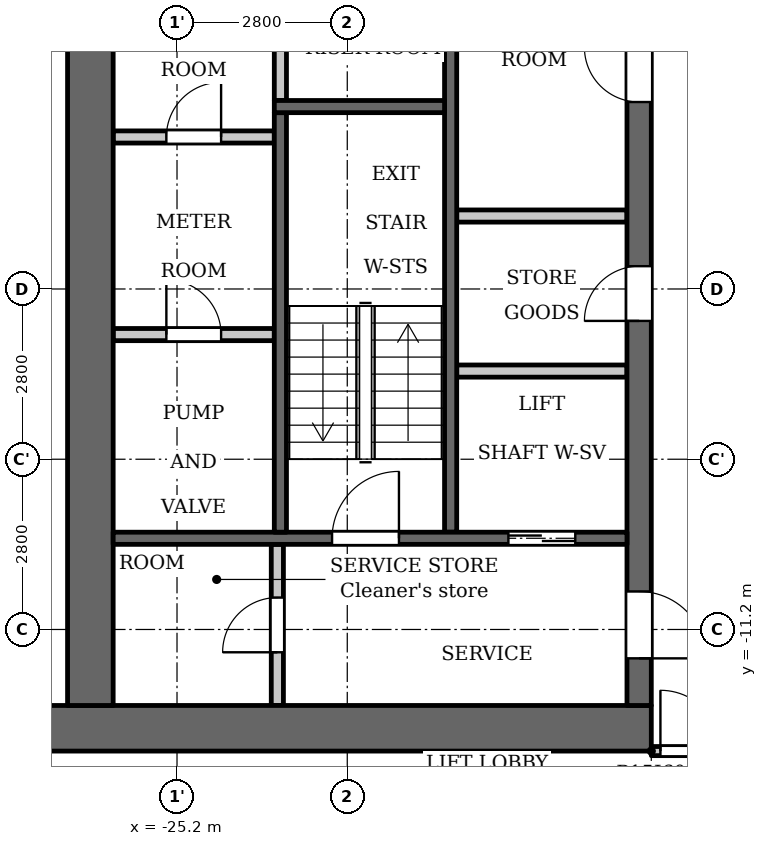
"""IFC4 building model, lengths in metres.
Left out: names, types, materials, properties, quantities, classifications, styles, units other than length and angle.
Written with IfcOpenShell. Run it as: python <this file> out.ifc"""

import sys

from ifc_helpers import new_model, si_unit, direction, frame, frame_2d, origin, place, context, subcontext, project, spatial, rectangle, extrude, element, fill, save


model = new_model("IFC4")
c1 = context("Model", 3, precision=1e-05, world=origin(), true_north=direction((0.0, 1.0)))
c2 = subcontext(c1, "Body", "Model", "MODEL_VIEW")
j1 = project(units=[si_unit("LENGTHUNIT", "METRE"), si_unit("PLANEANGLEUNIT", "RADIAN")], contexts=[c1])
p1 = place(None, origin())
s1 = spatial("IfcSite", under=j1, at=p1, CompositionType="ELEMENT")
p2 = place(p1, origin())
s2 = spatial("IfcBuilding", under=s1, at=p2, CompositionType="ELEMENT")
p3 = place(p2, frame((0.0, 0.0, 150.1)))
s3 = spatial("IfcBuildingStorey", under=s2, at=p3, CompositionType="ELEMENT", Elevation=150.1)
p4 = place(p3, frame((-23.5, -2.5, 0.0), z_axis=(0.0, 0.0, 1.0), x_axis=(0.0, 1.0, 0.0)))
e1 = element("IfcWall", 1, at=p4, inside=s3, PredefinedType="PARTITIONING", context=c2, shape_type="SweptSolid", body=[
    extrude(rectangle(XDim=2.65, YDim=0.2, at=frame_2d((1.325, 0.0))), origin(), (0.0, 0.0, 1.0), 3.2),
])
p5 = place(p3, frame((-20.7, -9.6, 0.0), z_axis=(0.0, 0.0, 1.0), x_axis=(0.0, 1.0, 0.0)))
e2 = element("IfcWall", 2, at=p5, inside=s3, PredefinedType="SHEAR", context=c2, shape_type="SweptSolid", body=[
    extrude(rectangle(XDim=9.75, YDim=0.2, at=frame_2d((4.875, 0.0))), origin(), (0.0, 0.0, 1.0), 3.2),
])
p6 = place(p3, frame((-17.4, -12.825, 0.0), z_axis=(0.0, 0.0, 1.0), x_axis=(-1.0, 0.0, 0.0)))
e3 = element("IfcWall", 3, at=p6, inside=s3, PredefinedType="SHEAR", context=c2, shape_type="SweptSolid", body=[
    extrude(rectangle(XDim=10.4, YDim=0.75, at=frame_2d((5.2, 0.0))), origin(), (0.0, 0.0, 1.0), 3.2),
])
p7 = place(p3, frame((-17.8, -4.4, 0.0), z_axis=(0.0, 0.0, 1.0), x_axis=(-1.0, 0.0, 0.0)))
e4 = element("IfcWall", 4, at=p7, inside=s3, PredefinedType="PARTITIONING", context=c2, shape_type="SweptSolid", body=[
    extrude(rectangle(XDim=2.8, YDim=0.2, at=frame_2d((1.4, 0.0))), origin(), (0.0, 0.0, 1.0), 3.2),
])
p8 = place(p3, frame((-17.6, -12.45, 0.0), z_axis=(0.0, 0.0, 1.0), x_axis=(0.0, 1.0, 0.0)))
e5 = element("IfcWall", 5, at=p8, inside=s3, PredefinedType="SHEAR", context=c2, shape_type="SweptSolid", body=[
    extrude(rectangle(XDim=24.9, YDim=0.4, at=frame_2d((12.45, 0.0))), origin(), (0.0, 0.0, 1.0), 3.2),
])
p9 = place(p8, frame((6.325, 0.0, 0.0)))
e6 = element("IfcOpeningElement", 6, at=p9, cuts=e5, PredefinedType="OPENING", context=c2, shape_type="SweptSolid", body=[
    extrude(rectangle(XDim=0.9, YDim=2.1, at=frame_2d((0.45, 1.05))), frame((0.0, 0.21, 0.0), z_axis=(0.0, -1.0, 0.0), x_axis=(1.0, 0.0, 0.0)), (0.0, 0.0, 1.0), 0.42),
])
p10 = place(p8, frame((9.925, 0.0, 0.0)))
e7 = element("IfcOpeningElement", 7, at=p10, cuts=e5, PredefinedType="OPENING", context=c2, shape_type="SweptSolid", body=[
    extrude(rectangle(XDim=0.9, YDim=2.1, at=frame_2d((0.45, 1.05))), frame((0.0, 0.21, 0.0), z_axis=(0.0, -1.0, 0.0), x_axis=(1.0, 0.0, 0.0)), (0.0, 0.0, 1.0), 0.42),
])
p11 = place(p8, frame((15.6, 0.0, 0.0)))
e8 = element("IfcOpeningElement", 8, at=p11, cuts=e5, PredefinedType="OPENING", context=c2, shape_type="SweptSolid", body=[
    extrude(rectangle(XDim=1.1, YDim=2.1, at=frame_2d((0.55, 1.05))), frame((0.0, 0.21, 0.0), z_axis=(0.0, -1.0, 0.0), x_axis=(1.0, 0.0, 0.0)), (0.0, 0.0, 1.0), 0.42),
])
p12 = place(p8, frame((18.0, 0.0, 0.0)))
e9 = element("IfcOpeningElement", 9, at=p12, cuts=e5, PredefinedType="OPENING", context=c2, shape_type="SweptSolid", body=[
    extrude(rectangle(XDim=1.1, YDim=2.1, at=frame_2d((0.55, 1.05))), frame((0.0, 0.21, 0.0), z_axis=(0.0, -1.0, 0.0), x_axis=(1.0, 0.0, 0.0)), (0.0, 0.0, 1.0), 0.42),
])
p13 = place(p8, frame((23.025, 0.0, 0.0)))
e10 = element("IfcOpeningElement", 10, at=p13, cuts=e5, PredefinedType="OPENING", context=c2, shape_type="SweptSolid", body=[
    extrude(rectangle(XDim=1.1, YDim=2.1, at=frame_2d((0.55, 1.05))), frame((0.0, 0.21, 0.0), z_axis=(0.0, -1.0, 0.0), x_axis=(1.0, 0.0, 0.0)), (0.0, 0.0, 1.0), 0.42),
])
p14 = place(p8, frame((0.775, 0.0, 0.0)))
e11 = element("IfcOpeningElement", 11, at=p14, cuts=e5, PredefinedType="OPENING", context=c2, shape_type="SweptSolid", body=[
    extrude(rectangle(XDim=1.1, YDim=2.1, at=frame_2d((0.55, 1.05))), frame((0.0, 0.21, 0.0), z_axis=(0.0, -1.0, 0.0), x_axis=(1.0, 0.0, 0.0)), (0.0, 0.0, 1.0), 0.42),
])
p15 = place(p8, frame((12.925, 0.0, 0.0)))
e12 = element("IfcOpeningElement", 12, at=p15, cuts=e5, PredefinedType="OPENING", context=c2, shape_type="SweptSolid", body=[
    extrude(rectangle(XDim=1.8, YDim=2.1, at=frame_2d((0.9, 1.05))), frame((0.0, 0.21, 0.0), z_axis=(0.0, -1.0, 0.0), x_axis=(1.0, 0.0, 0.0)), (0.0, 0.0, 1.0), 0.42),
])
p16 = place(p3, frame((-26.625, -12.45, 0.0), z_axis=(0.0, 0.0, 1.0), x_axis=(0.0, 1.0, 0.0)))
e13 = element("IfcWall", 13, at=p16, inside=s3, PredefinedType="SHEAR", context=c2, shape_type="SweptSolid", body=[
    extrude(rectangle(XDim=24.9, YDim=0.75, at=frame_2d((12.45, 0.0))), origin(), (0.0, 0.0, 1.0), 3.2),
])
p17 = place(p3, frame((-23.55, -12.45, 0.0), z_axis=(0.0, 0.0, 1.0), x_axis=(0.0, 1.0, 0.0)))
e14 = element("IfcWall", 14, at=p17, inside=s3, PredefinedType="PARTITIONING", context=c2, shape_type="SweptSolid", body=[
    extrude(rectangle(XDim=2.65, YDim=0.2, at=frame_2d((1.325, 0.0))), origin(), (0.0, 0.0, 1.0), 3.2),
])
p18 = place(p17, frame((0.875, 0.0, 0.0)))
e15 = element("IfcOpeningElement", 15, at=p18, cuts=e14, PredefinedType="OPENING", context=c2, shape_type="SweptSolid", body=[
    extrude(rectangle(XDim=0.9, YDim=2.1, at=frame_2d((0.45, 1.05))), frame((0.0, 0.11, 0.0), z_axis=(0.0, -1.0, 0.0), x_axis=(1.0, 0.0, 0.0)), (0.0, 0.0, 1.0), 0.22),
])
p19 = place(p3, frame((-23.6, -6.35, 0.0), z_axis=(0.0, 0.0, 1.0), x_axis=(-1.0, 0.0, 0.0)))
e16 = element("IfcWall", 16, at=p19, inside=s3, PredefinedType="PARTITIONING", context=c2, shape_type="SweptSolid", body=[
    extrude(rectangle(XDim=2.65, YDim=0.2, at=frame_2d((1.325, 0.0))), origin(), (0.0, 0.0, 1.0), 3.2),
])
p20 = place(p19, frame((0.875, 0.0, 0.0)))
e17 = element("IfcOpeningElement", 17, at=p20, cuts=e16, PredefinedType="OPENING", context=c2, shape_type="SweptSolid", body=[
    extrude(rectangle(XDim=0.9, YDim=2.1, at=frame_2d((0.45, 1.05))), frame((0.0, 0.11, 0.0), z_axis=(0.0, -1.0, 0.0), x_axis=(1.0, 0.0, 0.0)), (0.0, 0.0, 1.0), 0.22),
])
p21 = place(p3, frame((-23.6, -3.1, 0.0), z_axis=(0.0, 0.0, 1.0), x_axis=(-1.0, 0.0, 0.0)))
e18 = element("IfcWall", 18, at=p21, inside=s3, PredefinedType="PARTITIONING", context=c2, shape_type="SweptSolid", body=[
    extrude(rectangle(XDim=2.65, YDim=0.2, at=frame_2d((1.325, 0.0))), origin(), (0.0, 0.0, 1.0), 3.2),
])
p22 = place(p21, frame((0.875, 0.0, 0.0)))
e19 = element("IfcOpeningElement", 19, at=p22, cuts=e18, PredefinedType="OPENING", context=c2, shape_type="SweptSolid", body=[
    extrude(rectangle(XDim=0.9, YDim=2.1, at=frame_2d((0.45, 1.05))), frame((0.0, 0.11, 0.0), z_axis=(0.0, -1.0, 0.0), x_axis=(1.0, 0.0, 0.0)), (0.0, 0.0, 1.0), 0.22),
])
p23 = place(p3, frame((-17.8, -9.7, 0.0), z_axis=(0.0, 0.0, 1.0), x_axis=(-1.0, 0.0, 0.0)))
e20 = element("IfcWall", 20, at=p23, inside=s3, PredefinedType="SHEAR", context=c2, shape_type="SweptSolid", body=[
    extrude(rectangle(XDim=8.45, YDim=0.2, at=frame_2d((4.225, 0.0))), origin(), (0.0, 0.0, 1.0), 3.2),
])
p24 = place(p23, frame((0.85, 0.0, 0.0)))
e21 = element("IfcOpeningElement", 21, at=p24, cuts=e20, PredefinedType="OPENING", context=c2, shape_type="SweptSolid", body=[
    extrude(rectangle(XDim=1.1, YDim=2.1, at=frame_2d((0.55, 1.05))), frame((0.0, 0.11, 0.0), z_axis=(0.0, -1.0, 0.0), x_axis=(1.0, 0.0, 0.0)), (0.0, 0.0, 1.0), 0.22),
])
p25 = place(p23, frame((3.75, 0.0, 0.0)))
e22 = element("IfcOpeningElement", 22, at=p25, cuts=e20, PredefinedType="OPENING", context=c2, shape_type="SweptSolid", body=[
    extrude(rectangle(XDim=1.1, YDim=2.1, at=frame_2d((0.55, 1.05))), frame((0.0, 0.11, 0.0), z_axis=(0.0, -1.0, 0.0), x_axis=(1.0, 0.0, 0.0)), (0.0, 0.0, 1.0), 0.22),
])
p26 = place(p3, frame((-17.8, -6.95, 0.0), z_axis=(0.0, 0.0, 1.0), x_axis=(-1.0, 0.0, 0.0)))
e23 = element("IfcWall", 23, at=p26, inside=s3, PredefinedType="PARTITIONING", context=c2, shape_type="SweptSolid", body=[
    extrude(rectangle(XDim=2.8, YDim=0.2, at=frame_2d((1.4, 0.0))), origin(), (0.0, 0.0, 1.0), 3.2),
])
p27 = place(p3, frame((-23.5, -9.6, 0.0), z_axis=(0.0, 0.0, 1.0), x_axis=(0.0, 1.0, 0.0)))
e24 = element("IfcWall", 24, at=p27, inside=s3, PredefinedType="SHEAR", context=c2, shape_type="SweptSolid", body=[
    extrude(rectangle(XDim=6.9, YDim=0.2, at=frame_2d((3.45, 0.0))), origin(), (0.0, 0.0, 1.0), 3.2),
])
p28 = place(p3, frame((-20.8, -2.6, 0.0), z_axis=(0.0, 0.0, 1.0), x_axis=(-1.0, 0.0, 0.0)))
e25 = element("IfcWall", 25, at=p28, inside=s3, PredefinedType="SHEAR", context=c2, shape_type="SweptSolid", body=[
    extrude(rectangle(XDim=2.8, YDim=0.2, at=frame_2d((1.4, 0.0))), origin(), (0.0, 0.0, 1.0), 3.2),
])
p29 = place(p3, frame((-17.4, -13.2, 0.0), z_axis=(0.0, 0.0, 1.0), x_axis=(1.0, 0.0, 0.0)))
e26 = element("IfcWall", 26, at=p29, inside=s3, PredefinedType="PARTITIONING", context=c2, shape_type="SweptSolid", body=[
    extrude(rectangle(XDim=34.8, YDim=0.15, at=frame_2d((17.4, 0.0))), origin(), (0.0, 0.0, 1.0), 3.2),
])
p30 = place(p29, frame((0.15, 0.0, 0.0)))
e27 = element("IfcOpeningElement", 27, at=p30, cuts=e26, PredefinedType="OPENING", context=c2, shape_type="SweptSolid", body=[
    extrude(rectangle(XDim=1.0, YDim=2.1, at=frame_2d((0.5, 1.05))), frame((0.0, 0.085, 0.0), z_axis=(0.0, -1.0, 0.0), x_axis=(1.0, 0.0, 0.0)), (0.0, 0.0, 1.0), 0.17),
])
p31 = place(p29, frame((33.55, 0.0, 0.0)))
e28 = element("IfcOpeningElement", 28, at=p31, cuts=e26, PredefinedType="OPENING", context=c2, shape_type="SweptSolid", body=[
    extrude(rectangle(XDim=1.0, YDim=2.1, at=frame_2d((0.5, 1.05))), frame((0.0, 0.085, 0.0), z_axis=(0.0, -1.0, 0.0), x_axis=(1.0, 0.0, 0.0)), (0.0, 0.0, 1.0), 0.17),
])
p32 = place(p29, frame((15.7, 0.0, 0.0)))
e29 = element("IfcOpeningElement", 29, at=p32, cuts=e26, PredefinedType="OPENING", context=c2, shape_type="SweptSolid", body=[
    extrude(rectangle(XDim=1.0, YDim=2.1, at=frame_2d((0.5, 1.05))), frame((0.0, 0.085, 0.0), z_axis=(0.0, -1.0, 0.0), x_axis=(1.0, 0.0, 0.0)), (0.0, 0.0, 1.0), 0.17),
])
p33 = place(p24, origin())
e30 = element("IfcDoor", 30, at=p33, inside=s3, OperationType="DOUBLE_DOOR_SLIDING", PredefinedType="DOOR", context=c2, shape_type="SweptSolid", body=[
    extrude(rectangle(XDim=1.1, YDim=2.1, at=frame_2d((0.55, 1.05))), frame((0.0, 0.025, 0.0), z_axis=(0.0, -1.0, 0.0), x_axis=(1.0, 0.0, 0.0)), (0.0, 0.0, 1.0), 0.05),
])
fill(e21, e30)
p34 = place(p9, origin())
e31 = element("IfcDoor", 31, at=p34, inside=s3, OperationType="SINGLE_SWING_RIGHT", PredefinedType="DOOR", context=c2, shape_type="SweptSolid", body=[
    extrude(rectangle(XDim=0.9, YDim=2.1, at=frame_2d((0.45, 1.05))), frame((0.0, 0.025, 0.0), z_axis=(0.0, -1.0, 0.0), x_axis=(1.0, 0.0, 0.0)), (0.0, 0.0, 1.0), 0.05),
])
fill(e6, e31)
p35 = place(p10, origin())
e32 = element("IfcDoor", 32, at=p35, inside=s3, OperationType="SINGLE_SWING_LEFT", PredefinedType="DOOR", context=c2, shape_type="SweptSolid", body=[
    extrude(rectangle(XDim=0.9, YDim=2.1, at=frame_2d((0.45, 1.05))), frame((0.0, 0.025, 0.0), z_axis=(0.0, -1.0, 0.0), x_axis=(1.0, 0.0, 0.0)), (0.0, 0.0, 1.0), 0.05),
])
fill(e7, e32)
p36 = place(p14, origin())
e33 = element("IfcDoor", 33, at=p36, inside=s3, OperationType="SINGLE_SWING_LEFT", PredefinedType="DOOR", context=c2, shape_type="SweptSolid", body=[
    extrude(rectangle(XDim=1.1, YDim=2.1, at=frame_2d((0.55, 1.05))), frame((0.0, 0.025, 0.0), z_axis=(0.0, -1.0, 0.0), x_axis=(1.0, 0.0, 0.0)), (0.0, 0.0, 1.0), 0.05),
])
fill(e11, e33)
p37 = place(p18, origin())
e34 = element("IfcDoor", 34, at=p37, inside=s3, OperationType="SINGLE_SWING_RIGHT", PredefinedType="DOOR", context=c2, shape_type="SweptSolid", body=[
    extrude(rectangle(XDim=0.9, YDim=2.1, at=frame_2d((0.45, 1.05))), frame((0.0, 0.025, 0.0), z_axis=(0.0, -1.0, 0.0), x_axis=(1.0, 0.0, 0.0)), (0.0, 0.0, 1.0), 0.05),
])
fill(e15, e34)
p38 = place(p25, origin())
e35 = element("IfcDoor", 35, at=p38, inside=s3, OperationType="SINGLE_SWING_LEFT", PredefinedType="DOOR", context=c2, shape_type="SweptSolid", body=[
    extrude(rectangle(XDim=1.1, YDim=2.1, at=frame_2d((0.55, 1.05))), frame((0.0, 0.025, 0.0), z_axis=(0.0, -1.0, 0.0), x_axis=(1.0, 0.0, 0.0)), (0.0, 0.0, 1.0), 0.05),
])
fill(e22, e35)
p39 = place(p20, origin())
e36 = element("IfcDoor", 36, at=p39, inside=s3, OperationType="SINGLE_SWING_RIGHT", PredefinedType="DOOR", context=c2, shape_type="SweptSolid", body=[
    extrude(rectangle(XDim=0.9, YDim=2.1, at=frame_2d((0.45, 1.05))), frame((0.0, 0.025, 0.0), z_axis=(0.0, -1.0, 0.0), x_axis=(1.0, 0.0, 0.0)), (0.0, 0.0, 1.0), 0.05),
])
fill(e17, e36)
p40 = place(p22, origin())
e37 = element("IfcDoor", 37, at=p40, inside=s3, OperationType="SINGLE_SWING_LEFT", PredefinedType="DOOR", context=c2, shape_type="SweptSolid", body=[
    extrude(rectangle(XDim=0.9, YDim=2.1, at=frame_2d((0.45, 1.05))), frame((0.0, 0.025, 0.0), z_axis=(0.0, -1.0, 0.0), x_axis=(1.0, 0.0, 0.0)), (0.0, 0.0, 1.0), 0.05),
])
fill(e19, e37)
p41 = place(p30, origin())
e38 = element("IfcDoor", 38, at=p41, inside=s3, OperationType="SINGLE_SWING_RIGHT", PredefinedType="DOOR", context=c2, shape_type="SweptSolid", body=[
    extrude(rectangle(XDim=1.0, YDim=2.1, at=frame_2d((0.5, 1.05))), frame((0.0, 0.025, 0.0), z_axis=(0.0, -1.0, 0.0), x_axis=(1.0, 0.0, 0.0)), (0.0, 0.0, 1.0), 0.05),
])
fill(e27, e38)
save(model, sys.argv[1])
